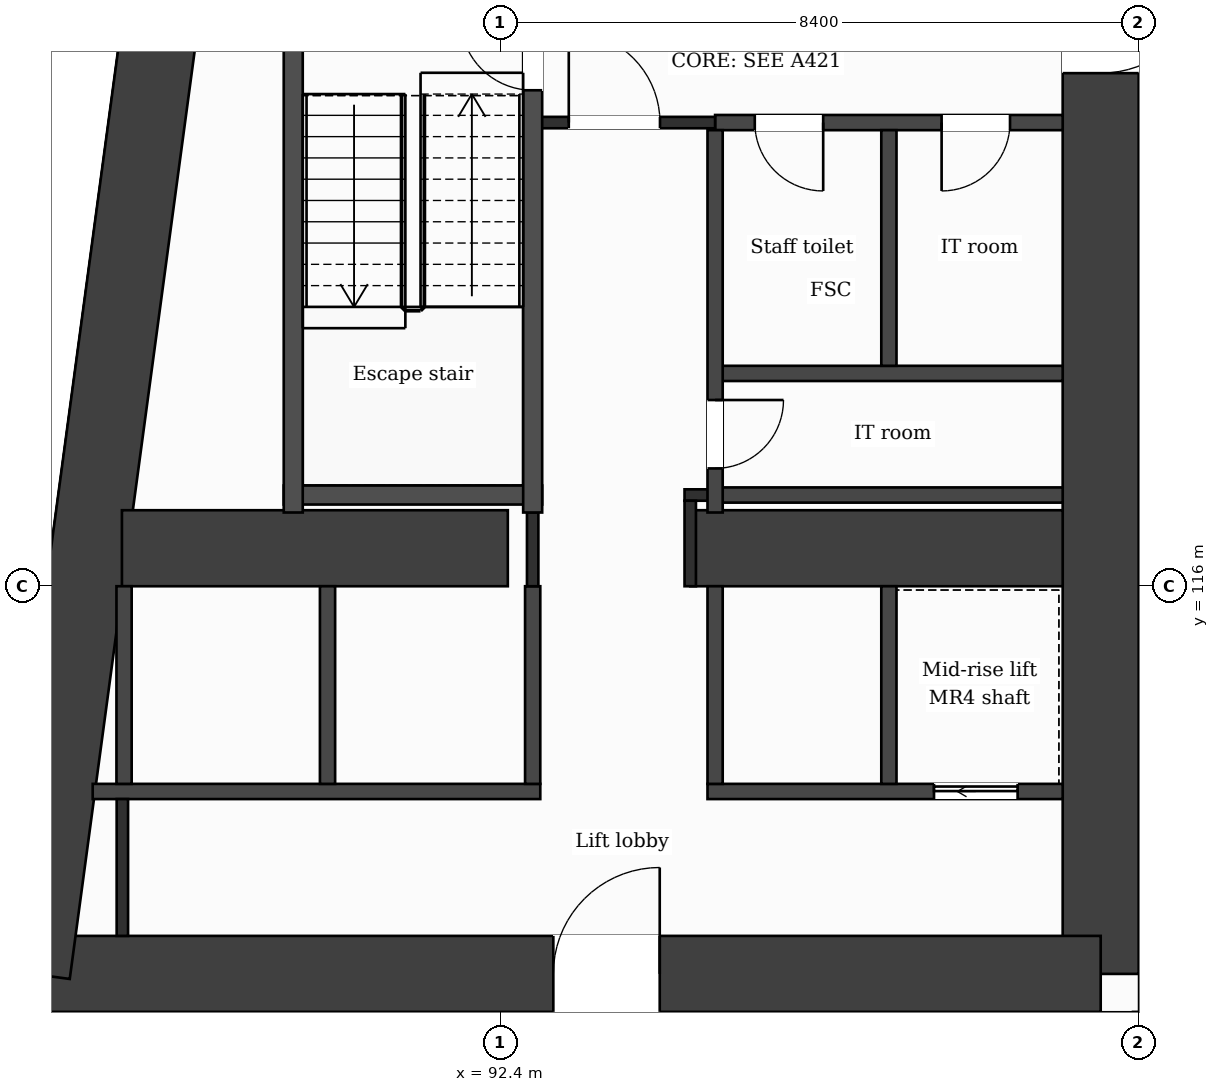
"""IFC4 building model, lengths in metres.
Left out: names, types, materials, properties, quantities, classifications, styles, units other than length and angle.
Written with IfcOpenShell. Run it as: python <this file> out.ifc"""

import sys

from ifc_helpers import new_model, si_unit, direction, frame, frame_2d, origin, place, context, subcontext, project, spatial, rectangle, extrude, element, fill, save


model = new_model("IFC4")
c1 = context("Model", 3, precision=1e-05, world=origin(), true_north=direction((0.0, 1.0)))
c2 = subcontext(c1, "Body", "Model", "MODEL_VIEW")
j1 = project(units=[si_unit("LENGTHUNIT", "METRE"), si_unit("PLANEANGLEUNIT", "RADIAN")], contexts=[c1])
p1 = place(None, origin())
s1 = spatial("IfcSite", under=j1, at=p1, CompositionType="ELEMENT")
p2 = place(p1, origin())
s2 = spatial("IfcBuilding", under=s1, at=p2, CompositionType="ELEMENT")
p3 = place(p2, frame((0.0, 0.0, 91.0)))
s3 = spatial("IfcBuildingStorey", under=s2, at=p3, CompositionType="ELEMENT", Elevation=91.0)
p4 = place(p3, frame((100.3, 131.9, 0.0), z_axis=(0.0, 0.0, 1.0), x_axis=(0.0, -1.0, 0.0)))
e1 = element("IfcWall", 1, at=p4, inside=s3, PredefinedType="SHEAR", context=c2, shape_type="SweptSolid", body=[
    extrude(rectangle(XDim=21.0, YDim=1.0, at=frame_2d((10.5, 0.0))), origin(), (0.0, 0.0, 1.0), 3.7),
])
p5 = place(p4, frame((7.75, 0.0, 0.0)))
e2 = element("IfcOpeningElement", 2, at=p5, cuts=e1, PredefinedType="OPENING", context=c2, shape_type="SweptSolid", body=[
    extrude(rectangle(XDim=1.4, YDim=2.1, at=frame_2d((0.7, 1.05))), frame((0.0, 0.51, 0.0), z_axis=(0.0, -1.0, 0.0), x_axis=(1.0, 0.0, 0.0)), (0.0, 0.0, 1.0), 1.02),
])
p6 = place(p3, frame((100.3, 110.9, 0.0), z_axis=(0.0, 0.0, 1.0), x_axis=(-1.0, 0.0, 0.0)))
e3 = element("IfcWall", 3, at=p6, inside=s3, PredefinedType="SHEAR", context=c2, shape_type="SweptSolid", body=[
    extrude(rectangle(XDim=14.059, YDim=1.0, at=frame_2d((7.03, 0.0))), origin(), (0.0, 0.0, 1.0), 3.7),
])
p7 = place(p6, frame((5.802, 0.0, 0.0)))
e4 = element("IfcOpeningElement", 4, at=p7, cuts=e3, PredefinedType="OPENING", context=c2, shape_type="SweptSolid", body=[
    extrude(rectangle(XDim=1.4, YDim=2.1, at=frame_2d((0.7, 1.05))), frame((0.0, 0.51, 0.0), z_axis=(0.0, -1.0, 0.0), x_axis=(1.0, 0.0, 0.0)), (0.0, 0.0, 1.0), 1.02),
])
p8 = place(p3, frame((86.241, 110.9, 0.0), z_axis=(0.0, 0.0, 1.0), x_axis=(0.133411141623, 0.991060778808, 0.0)))
e5 = element("IfcWall", 5, at=p8, inside=s3, PredefinedType="SHEAR", context=c2, shape_type="SweptSolid", body=[
    extrude(rectangle(XDim=21.189, YDim=1.0, at=frame_2d((10.595, 0.0))), origin(), (0.0, 0.0, 1.0), 3.7),
])
p9 = place(p3, frame((87.423, 116.5, 0.0), z_axis=(0.0, 0.0, 1.0), x_axis=(1.0, 0.0, 0.0)))
e6 = element("IfcWall", 6, at=p9, inside=s3, PredefinedType="SHEAR", context=c2, shape_type="SweptSolid", body=[
    extrude(rectangle(XDim=5.077, YDim=1.0, at=frame_2d((2.539, 0.0))), origin(), (0.0, 0.0, 1.0), 3.7),
])
p10 = place(p3, frame((94.9, 116.5, 0.0), z_axis=(0.0, 0.0, 1.0), x_axis=(1.0, 0.0, 0.0)))
e7 = element("IfcWall", 7, at=p10, inside=s3, PredefinedType="SHEAR", context=c2, shape_type="SweptSolid", body=[
    extrude(rectangle(XDim=4.9, YDim=1.0, at=frame_2d((2.45, 0.0))), origin(), (0.0, 0.0, 1.0), 3.7),
])
p11 = place(p3, frame((87.334, 110.4, 0.0), z_axis=(0.0, 0.0, 1.0), x_axis=(-0.133437175554, -0.991057273915, 0.0)))
e8 = element("IfcWall", 8, at=p11, inside=s3, PredefinedType="SOLIDWALL", context=c2, shape_type="SweptSolid", body=[
    extrude(rectangle(XDim=6.781, YDim=0.3, at=frame_2d((3.39, 0.0))), origin(), (0.0, 0.0, 1.0), 3.38),
])
p12 = place(p11, frame((1.418, 0.0, 0.0)))
e9 = element("IfcOpeningElement", 9, at=p12, cuts=e8, PredefinedType="OPENING", context=c2, shape_type="SweptSolid", body=[
    extrude(rectangle(XDim=1.2, YDim=2.4, at=frame_2d((0.6, 1.2))), frame((0.0, 0.16, 0.0), z_axis=(0.0, -1.0, 0.0), x_axis=(1.0, 0.0, 0.0)), (0.0, 0.0, 1.0), 0.32),
])
p13 = place(p11, frame((4.758, 0.0, 0.9)))
e10 = element("IfcOpeningElement", 10, at=p13, cuts=e8, PredefinedType="OPENING", context=c2, shape_type="SweptSolid", body=[
    extrude(rectangle(XDim=1.2, YDim=2.1, at=frame_2d((0.6, 1.05))), frame((0.0, 0.16, 0.0), z_axis=(0.0, -1.0, 0.0), x_axis=(1.0, 0.0, 0.0)), (0.0, 0.0, 1.0), 0.32),
])
p14 = place(p3, frame((87.039, 113.3, 0.0), z_axis=(0.0, 0.0, 1.0), x_axis=(1.0, 0.0, 0.0)))
e11 = element("IfcWall", 11, at=p14, inside=s3, PredefinedType="PARTITIONING", context=c2, shape_type="SweptSolid", body=[
    extrude(rectangle(XDim=5.888, YDim=0.2, at=frame_2d((2.944, 0.0))), origin(), (0.0, 0.0, 1.0), 3.38),
])
p15 = place(p3, frame((95.127, 113.3, 0.0), z_axis=(0.0, 0.0, 1.0), x_axis=(1.0, 0.0, 0.0)))
e12 = element("IfcWall", 12, at=p15, inside=s3, PredefinedType="PARTITIONING", context=c2, shape_type="SweptSolid", body=[
    extrude(rectangle(XDim=4.673, YDim=0.2, at=frame_2d((2.336, 0.0))), origin(), (0.0, 0.0, 1.0), 3.38),
])
p16 = place(p15, frame((2.98, 0.0, 0.0)))
e13 = element("IfcOpeningElement", 13, at=p16, cuts=e12, PredefinedType="OPENING", context=c2, shape_type="SweptSolid", body=[
    extrude(rectangle(XDim=1.1, YDim=2.1, at=frame_2d((0.55, 1.05))), frame((0.0, 0.11, 0.0), z_axis=(0.0, -1.0, 0.0), x_axis=(1.0, 0.0, 0.0)), (0.0, 0.0, 1.0), 0.22),
])
p17 = place(p3, frame((95.227, 117.2, 0.0), z_axis=(0.0, 0.0, 1.0), x_axis=(1.0, 0.0, 0.0)))
e14 = element("IfcWall", 14, at=p17, inside=s3, PredefinedType="PARTITIONING", context=c2, shape_type="SweptSolid", body=[
    extrude(rectangle(XDim=4.573, YDim=0.2, at=frame_2d((2.287, 0.0))), origin(), (0.0, 0.0, 1.0), 3.38),
])
p18 = place(p3, frame((94.825, 117.2, 0.0), z_axis=(0.0, 0.0, 1.0), x_axis=(1.0, 0.0, 0.0)))
e15 = element("IfcWall", 15, at=p18, inside=s3, PredefinedType="PARTITIONING", context=c2, shape_type="SweptSolid", body=[
    extrude(rectangle(XDim=0.402, YDim=0.15, at=frame_2d((0.201, 0.0))), origin(), (0.0, 0.0, 1.0), 3.38),
])
p19 = place(p3, frame((89.552, 117.2, 0.0), z_axis=(0.0, 0.0, 1.0), x_axis=(1.0, 0.0, 0.0)))
e16 = element("IfcWall", 16, at=p19, inside=s3, PredefinedType="PARTITIONING", context=c2, shape_type="SweptSolid", body=[
    extrude(rectangle(XDim=3.4, YDim=0.25, at=frame_2d((1.7, 0.0))), origin(), (0.0, 0.0, 1.0), 3.38),
])
p20 = place(p3, frame((95.227, 118.8, 0.0), z_axis=(0.0, 0.0, 1.0), x_axis=(1.0, 0.0, 0.0)))
e17 = element("IfcWall", 17, at=p20, inside=s3, PredefinedType="PARTITIONING", context=c2, shape_type="SweptSolid", body=[
    extrude(rectangle(XDim=4.573, YDim=0.2, at=frame_2d((2.287, 0.0))), origin(), (0.0, 0.0, 1.0), 3.38),
])
p21 = place(p3, frame((95.227, 122.1, 0.0), z_axis=(0.0, 0.0, 1.0), x_axis=(1.0, 0.0, 0.0)))
e18 = element("IfcWall", 18, at=p21, inside=s3, PredefinedType="PARTITIONING", context=c2, shape_type="SweptSolid", body=[
    extrude(rectangle(XDim=4.573, YDim=0.2, at=frame_2d((2.287, 0.0))), origin(), (0.0, 0.0, 1.0), 3.38),
])
p22 = place(p21, frame((0.522, 0.0, 0.0)))
e19 = element("IfcOpeningElement", 19, at=p22, cuts=e18, PredefinedType="OPENING", context=c2, shape_type="SweptSolid", body=[
    extrude(rectangle(XDim=0.9, YDim=2.1, at=frame_2d((0.45, 1.05))), frame((0.0, 0.11, 0.0), z_axis=(0.0, -1.0, 0.0), x_axis=(1.0, 0.0, 0.0)), (0.0, 0.0, 1.0), 0.22),
])
p23 = place(p21, frame((2.98, 0.0, 0.0)))
e20 = element("IfcOpeningElement", 20, at=p23, cuts=e18, PredefinedType="OPENING", context=c2, shape_type="SweptSolid", body=[
    extrude(rectangle(XDim=0.9, YDim=2.1, at=frame_2d((0.45, 1.05))), frame((0.0, 0.11, 0.0), z_axis=(0.0, -1.0, 0.0), x_axis=(1.0, 0.0, 0.0)), (0.0, 0.0, 1.0), 0.22),
])
p24 = place(p3, frame((92.827, 122.1, 0.0), z_axis=(0.0, 0.0, 1.0), x_axis=(1.0, 0.0, 0.0)))
e21 = element("IfcWall", 21, at=p24, inside=s3, PredefinedType="PARTITIONING", context=c2, shape_type="SweptSolid", body=[
    extrude(rectangle(XDim=2.4, YDim=0.15, at=frame_2d((1.2, 0.0))), origin(), (0.0, 0.0, 1.0), 3.38),
])
p25 = place(p24, frame((0.475, 0.0, 0.0)))
e22 = element("IfcOpeningElement", 22, at=p25, cuts=e21, PredefinedType="OPENING", context=c2, shape_type="SweptSolid", body=[
    extrude(rectangle(XDim=1.2, YDim=2.1, at=frame_2d((0.6, 1.05))), frame((0.0, 0.085, 0.0), z_axis=(0.0, -1.0, 0.0), x_axis=(1.0, 0.0, 0.0)), (0.0, 0.0, 1.0), 0.17),
])
p26 = place(p3, frame((87.451, 113.4, 0.0), z_axis=(0.0, 0.0, 1.0), x_axis=(0.0, 1.0, 0.0)))
e23 = element("IfcWall", 23, at=p26, inside=s3, PredefinedType="PARTITIONING", context=c2, shape_type="SweptSolid", body=[
    extrude(rectangle(XDim=2.6, YDim=0.2, at=frame_2d((1.3, 0.0))), origin(), (0.0, 0.0, 1.0), 3.38),
])
p27 = place(p3, frame((87.429, 111.4, 0.0), z_axis=(0.0, 0.0, 1.0), x_axis=(0.0, 1.0, 0.0)))
e24 = element("IfcWall", 24, at=p27, inside=s3, PredefinedType="PARTITIONING", context=c2, shape_type="SweptSolid", body=[
    extrude(rectangle(XDim=1.8, YDim=0.15, at=frame_2d((0.9, 0.0))), origin(), (0.0, 0.0, 1.0), 3.38),
])
p28 = place(p3, frame((89.677, 116.97, 0.0), z_axis=(0.0, 0.0, 1.0), x_axis=(0.0, 1.0, 0.0)))
e25 = element("IfcWall", 25, at=p28, inside=s3, PredefinedType="PARTITIONING", context=c2, shape_type="SweptSolid", body=[
    extrude(rectangle(XDim=6.855, YDim=0.25, at=frame_2d((3.427, 0.0))), origin(), (0.0, 0.0, 1.0), 3.38),
])
for number, where, z_axis, x_axis in (
    (26, (90.128, 113.4, 0.0), (0.0, 0.0, 1.0), (0.0, 1.0, 0.0)),
    (27, (92.827, 113.4, 0.0), (0.0, 0.0, 1.0), (0.0, 1.0, 0.0)),
):
    element("IfcWall", number, at=place(p3, frame(where, z_axis=z_axis, x_axis=x_axis)), inside=s3, PredefinedType="PARTITIONING", context=c2, shape_type="SweptSolid", body=[
        extrude(rectangle(XDim=2.6, YDim=0.2, at=frame_2d((1.3, 0.0))), origin(), (0.0, 0.0, 1.0), 3.38),
    ])
p29 = place(p3, frame((92.827, 116.0, 0.0), z_axis=(0.0, 0.0, 1.0), x_axis=(0.0, 1.0, 0.0)))
e28 = element("IfcWall", 28, at=p29, inside=s3, PredefinedType="PARTITIONING", context=c2, shape_type="SweptSolid", body=[
    extrude(rectangle(XDim=0.97, YDim=0.15, at=frame_2d((0.485, 0.0))), origin(), (0.0, 0.0, 1.0), 3.38),
])
p30 = place(p3, frame((92.827, 116.97, 0.0), z_axis=(0.0, 0.0, 1.0), x_axis=(0.0, 1.0, 0.0)))
e29 = element("IfcWall", 29, at=p30, inside=s3, PredefinedType="PARTITIONING", context=c2, shape_type="SweptSolid", body=[
    extrude(rectangle(XDim=6.855, YDim=0.25, at=frame_2d((3.427, 0.0))), origin(), (0.0, 0.0, 1.0), 3.38),
])
p31 = place(p30, frame((5.555, 0.0, 0.0)))
e30 = element("IfcOpeningElement", 30, at=p31, cuts=e29, PredefinedType="OPENING", context=c2, shape_type="SweptSolid", body=[
    extrude(rectangle(XDim=0.95, YDim=2.1, at=frame_2d((0.475, 1.05))), frame((0.0, 0.135, 0.0), z_axis=(0.0, -1.0, 0.0), x_axis=(1.0, 0.0, 0.0)), (0.0, 0.0, 1.0), 0.27),
])
p32 = place(p3, frame((94.9, 116.0, 0.0), z_axis=(0.0, 0.0, 1.0), x_axis=(0.0, 1.0, 0.0)))
e31 = element("IfcWall", 31, at=p32, inside=s3, PredefinedType="PARTITIONING", context=c2, shape_type="SweptSolid", body=[
    extrude(rectangle(XDim=1.125, YDim=0.15, at=frame_2d((0.562, 0.0))), origin(), (0.0, 0.0, 1.0), 3.38),
])
p33 = place(p3, frame((95.227, 113.4, 0.0), z_axis=(0.0, 0.0, 1.0), x_axis=(0.0, 1.0, 0.0)))
e32 = element("IfcWall", 32, at=p33, inside=s3, PredefinedType="PARTITIONING", context=c2, shape_type="SweptSolid", body=[
    extrude(rectangle(XDim=2.6, YDim=0.2, at=frame_2d((1.3, 0.0))), origin(), (0.0, 0.0, 1.0), 3.38),
])
p34 = place(p3, frame((95.227, 116.97, 0.0), z_axis=(0.0, 0.0, 1.0), x_axis=(0.0, 1.0, 0.0)))
e33 = element("IfcWall", 33, at=p34, inside=s3, PredefinedType="PARTITIONING", context=c2, shape_type="SweptSolid", body=[
    extrude(rectangle(XDim=5.03, YDim=0.2, at=frame_2d((2.515, 0.0))), origin(), (0.0, 0.0, 1.0), 3.38),
])
p35 = place(p34, frame((0.58, 0.0, 0.0)))
e34 = element("IfcOpeningElement", 34, at=p35, cuts=e33, PredefinedType="OPENING", context=c2, shape_type="SweptSolid", body=[
    extrude(rectangle(XDim=0.9, YDim=2.1, at=frame_2d((0.45, 1.05))), frame((0.0, 0.11, 0.0), z_axis=(0.0, -1.0, 0.0), x_axis=(1.0, 0.0, 0.0)), (0.0, 0.0, 1.0), 0.22),
])
p36 = place(p3, frame((97.513, 113.4, 0.0), z_axis=(0.0, 0.0, 1.0), x_axis=(0.0, 1.0, 0.0)))
e35 = element("IfcWall", 35, at=p36, inside=s3, PredefinedType="PARTITIONING", context=c2, shape_type="SweptSolid", body=[
    extrude(rectangle(XDim=2.6, YDim=0.2, at=frame_2d((1.3, 0.0))), origin(), (0.0, 0.0, 1.0), 3.38),
])
p37 = place(p3, frame((97.513, 118.9, 0.0), z_axis=(0.0, 0.0, 1.0), x_axis=(0.0, 1.0, 0.0)))
e36 = element("IfcWall", 36, at=p37, inside=s3, PredefinedType="PARTITIONING", context=c2, shape_type="SweptSolid", body=[
    extrude(rectangle(XDim=3.1, YDim=0.2, at=frame_2d((1.55, 0.0))), origin(), (0.0, 0.0, 1.0), 3.38),
])
p38 = place(p3, frame((100.8, 109.075, 0.0), z_axis=(0.0, 0.0, 1.0), x_axis=(0.0, 1.0, 0.0)))
e37 = element("IfcWall", 37, at=p38, inside=s3, PredefinedType="PARTITIONING", context=c2, shape_type="SweptSolid", body=[
    extrude(rectangle(XDim=1.325, YDim=0.15, at=frame_2d((0.663, 0.0))), origin(), (0.0, 0.0, 1.0), 3.38),
])
p39 = place(p25, origin())
e38 = element("IfcDoor", 38, at=p39, inside=s3, OperationType="SINGLE_SWING_LEFT", PredefinedType="DOOR", context=c2, shape_type="SweptSolid", body=[
    extrude(rectangle(XDim=1.2, YDim=2.1, at=frame_2d((0.6, 1.05))), frame((0.0, 0.025, 0.0), z_axis=(0.0, -1.0, 0.0), x_axis=(1.0, 0.0, 0.0)), (0.0, 0.0, 1.0), 0.05),
])
fill(e22, e38)
p40 = place(p22, origin())
e39 = element("IfcDoor", 39, at=p40, inside=s3, OperationType="SINGLE_SWING_RIGHT", PredefinedType="DOOR", context=c2, shape_type="SweptSolid", body=[
    extrude(rectangle(XDim=0.9, YDim=2.1, at=frame_2d((0.45, 1.05))), frame((0.0, 0.025, 0.0), z_axis=(0.0, -1.0, 0.0), x_axis=(1.0, 0.0, 0.0)), (0.0, 0.0, 1.0), 0.05),
])
fill(e19, e39)
p41 = place(p23, origin())
e40 = element("IfcDoor", 40, at=p41, inside=s3, OperationType="SINGLE_SWING_LEFT", PredefinedType="DOOR", context=c2, shape_type="SweptSolid", body=[
    extrude(rectangle(XDim=0.9, YDim=2.1, at=frame_2d((0.45, 1.05))), frame((0.0, 0.025, 0.0), z_axis=(0.0, -1.0, 0.0), x_axis=(1.0, 0.0, 0.0)), (0.0, 0.0, 1.0), 0.05),
])
fill(e20, e40)
p42 = place(p31, origin())
e41 = element("IfcDoor", 41, at=p42, inside=s3, OperationType="SINGLE_SWING_RIGHT", PredefinedType="DOOR", context=c2, shape_type="SweptSolid", body=[
    extrude(rectangle(XDim=0.95, YDim=2.1, at=frame_2d((0.475, 1.05))), frame((0.0, 0.025, 0.0), z_axis=(0.0, -1.0, 0.0), x_axis=(1.0, 0.0, 0.0)), (0.0, 0.0, 1.0), 0.05),
])
fill(e30, e41)
p43 = place(p35, origin())
e42 = element("IfcDoor", 42, at=p43, inside=s3, OperationType="SINGLE_SWING_RIGHT", PredefinedType="DOOR", context=c2, shape_type="SweptSolid", body=[
    extrude(rectangle(XDim=0.9, YDim=2.1, at=frame_2d((0.45, 1.05))), frame((0.0, 0.025, 0.0), z_axis=(0.0, -1.0, 0.0), x_axis=(1.0, 0.0, 0.0)), (0.0, 0.0, 1.0), 0.05),
])
fill(e34, e42)
p44 = place(p16, origin())
e43 = element("IfcDoor", 43, at=p44, inside=s3, OperationType="SLIDING_TO_LEFT", PredefinedType="DOOR", context=c2, shape_type="SweptSolid", body=[
    extrude(rectangle(XDim=1.1, YDim=2.1, at=frame_2d((0.55, 1.05))), frame((0.0, 0.025, 0.0), z_axis=(0.0, -1.0, 0.0), x_axis=(1.0, 0.0, 0.0)), (0.0, 0.0, 1.0), 0.05),
])
fill(e13, e43)
p45 = place(p7, origin())
e44 = element("IfcDoor", 44, at=p45, inside=s3, OperationType="SINGLE_SWING_LEFT", PredefinedType="DOOR", context=c2, shape_type="SweptSolid", body=[
    extrude(rectangle(XDim=1.4, YDim=2.1, at=frame_2d((0.7, 1.05))), frame((0.0, 0.025, 0.0), z_axis=(0.0, -1.0, 0.0), x_axis=(1.0, 0.0, 0.0)), (0.0, 0.0, 1.0), 0.05),
])
fill(e4, e44)
p46 = place(p5, origin())
e45 = element("IfcDoor", 45, at=p46, inside=s3, OperationType="SINGLE_SWING_LEFT", PredefinedType="DOOR", context=c2, shape_type="SweptSolid", body=[
    extrude(rectangle(XDim=1.4, YDim=2.1, at=frame_2d((0.7, 1.05))), frame((0.0, 0.025, 0.0), z_axis=(0.0, -1.0, 0.0), x_axis=(1.0, 0.0, 0.0)), (0.0, 0.0, 1.0), 0.05),
])
fill(e2, e45)
save(model, sys.argv[1])
